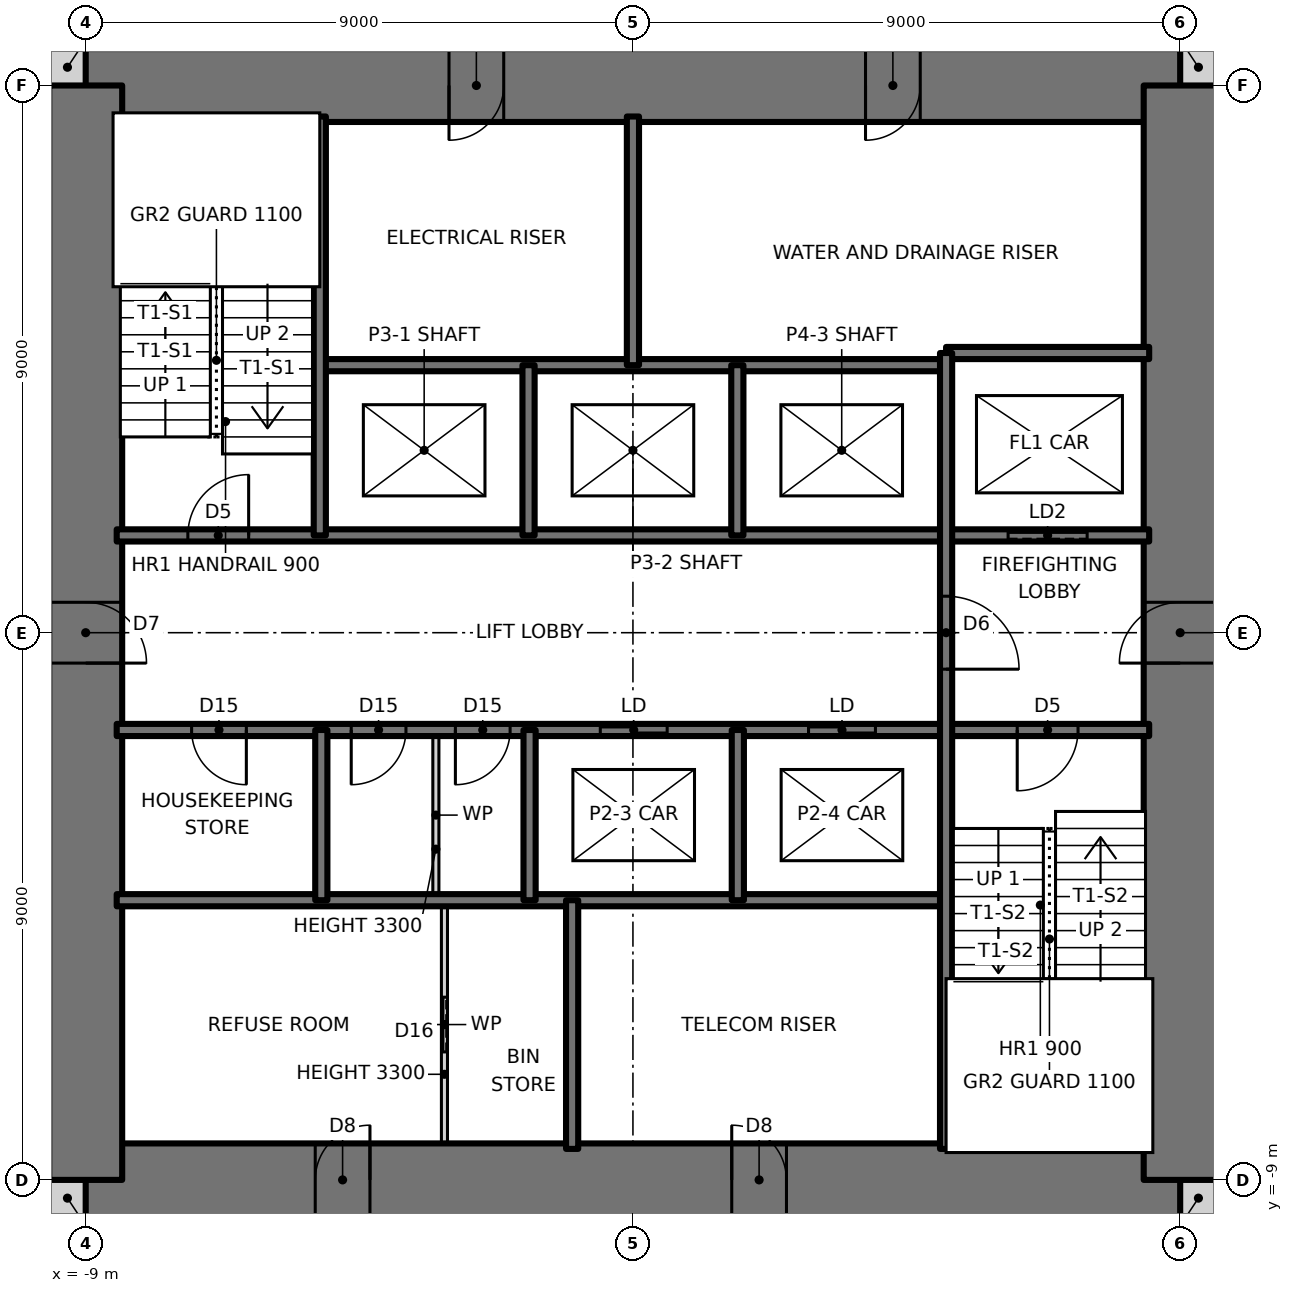
"""IFC4 building model, lengths in metres.
Left out: names, types, materials, properties, quantities, classifications, styles, units other than length and angle.
Written with IfcOpenShell. Run it as: python <this file> out.ifc"""

import sys

from ifc_helpers import new_model, si_unit, direction, frame, frame_2d, origin, place, context, subcontext, project, spatial, rectangle, extrude, element, fill, save


model = new_model("IFC4")
c1 = context("Model", 3, precision=1e-05, world=origin(), true_north=direction((0.0, 1.0)))
c2 = subcontext(c1, "Body", "Model", "MODEL_VIEW")
j1 = project(units=[si_unit("LENGTHUNIT", "METRE"), si_unit("PLANEANGLEUNIT", "RADIAN")], contexts=[c1])
p1 = place(None, origin())
s1 = spatial("IfcSite", under=j1, at=p1, CompositionType="ELEMENT")
p2 = place(p1, origin())
s2 = spatial("IfcBuilding", under=s1, at=p2, CompositionType="ELEMENT")
p3 = place(p2, frame((0.0, 0.0, 136.5)))
s3 = spatial("IfcBuildingStorey", under=s2, at=p3, CompositionType="ELEMENT", Elevation=136.5)
for number, where, z_axis, x_axis in (
    (1, (-9.6, -9.3, 0.0), (0.0, 0.0, 1.0), (1.0, 0.0, 0.0)),
    (2, (9.0, -9.3, 0.0), (0.0, 0.0, 1.0), (1.0, 0.0, 0.0)),
    (3, (9.0, 9.3, 0.0), (0.0, 0.0, 1.0), (1.0, 0.0, 0.0)),
    (4, (-9.6, 9.3, 0.0), (0.0, 0.0, 1.0), (1.0, 0.0, 0.0)),
):
    element("IfcWall", number, at=place(p3, frame(where, z_axis=z_axis, x_axis=x_axis)), inside=s3, PredefinedType="SOLIDWALL", context=c2, shape_type="SweptSolid", body=[
        extrude(rectangle(XDim=0.6, YDim=0.6, at=frame_2d((0.3, 0.0))), origin(), (0.0, 0.0, 1.0), 3.5),
    ])
p4 = place(p3, frame((-9.0, -9.0, 0.0), z_axis=(0.0, 0.0, 1.0), x_axis=(1.0, 0.0, 0.0)))
e5 = element("IfcWall", 5, at=p4, inside=s3, PredefinedType="SHEAR", context=c2, shape_type="SweptSolid", body=[
    extrude(rectangle(XDim=18.0, YDim=1.2, at=frame_2d((9.0, 0.0))), origin(), (0.0, 0.0, 1.0), 3.5),
])
p5 = place(p4, frame((3.775, 0.0, 0.0)))
e6 = element("IfcOpeningElement", 6, at=p5, cuts=e5, PredefinedType="OPENING", context=c2, shape_type="SweptSolid", body=[
    extrude(rectangle(XDim=0.9, YDim=2.1, at=frame_2d((0.45, 1.05))), frame((0.0, 0.61, 0.0), z_axis=(0.0, -1.0, 0.0), x_axis=(1.0, 0.0, 0.0)), (0.0, 0.0, 1.0), 1.22),
])
p6 = place(p4, frame((10.625, 0.0, 0.0)))
e7 = element("IfcOpeningElement", 7, at=p6, cuts=e5, PredefinedType="OPENING", context=c2, shape_type="SweptSolid", body=[
    extrude(rectangle(XDim=0.9, YDim=2.1, at=frame_2d((0.45, 1.05))), frame((0.0, 0.61, 0.0), z_axis=(0.0, -1.0, 0.0), x_axis=(1.0, 0.0, 0.0)), (0.0, 0.0, 1.0), 1.22),
])
p7 = place(p3, frame((9.0, 9.0, 0.0), z_axis=(0.0, 0.0, 1.0), x_axis=(-1.0, 0.0, 0.0)))
e8 = element("IfcWall", 8, at=p7, inside=s3, PredefinedType="SHEAR", context=c2, shape_type="SweptSolid", body=[
    extrude(rectangle(XDim=18.0, YDim=1.2, at=frame_2d((9.0, 0.0))), origin(), (0.0, 0.0, 1.0), 3.5),
])
p8 = place(p7, frame((11.125, 0.0, 0.0)))
e9 = element("IfcOpeningElement", 9, at=p8, cuts=e8, PredefinedType="OPENING", context=c2, shape_type="SweptSolid", body=[
    extrude(rectangle(XDim=0.9, YDim=2.1, at=frame_2d((0.45, 1.05))), frame((0.0, 0.61, 0.0), z_axis=(0.0, -1.0, 0.0), x_axis=(1.0, 0.0, 0.0)), (0.0, 0.0, 1.0), 1.22),
])
p9 = place(p7, frame((4.275, 0.0, 0.0)))
e10 = element("IfcOpeningElement", 10, at=p9, cuts=e8, PredefinedType="OPENING", context=c2, shape_type="SweptSolid", body=[
    extrude(rectangle(XDim=0.9, YDim=2.1, at=frame_2d((0.45, 1.05))), frame((0.0, 0.61, 0.0), z_axis=(0.0, -1.0, 0.0), x_axis=(1.0, 0.0, 0.0)), (0.0, 0.0, 1.0), 1.22),
])
p10 = place(p3, frame((9.0, -9.0, 0.0), z_axis=(0.0, 0.0, 1.0), x_axis=(0.0, 1.0, 0.0)))
e11 = element("IfcWall", 11, at=p10, inside=s3, PredefinedType="SHEAR", context=c2, shape_type="SweptSolid", body=[
    extrude(rectangle(XDim=18.0, YDim=1.2, at=frame_2d((9.0, 0.0))), origin(), (0.0, 0.0, 1.0), 3.5),
])
p11 = place(p10, frame((8.5, 0.0, 0.0)))
e12 = element("IfcOpeningElement", 12, at=p11, cuts=e11, PredefinedType="OPENING", context=c2, shape_type="SweptSolid", body=[
    extrude(rectangle(XDim=1.0, YDim=2.1, at=frame_2d((0.5, 1.05))), frame((0.0, 0.61, 0.0), z_axis=(0.0, -1.0, 0.0), x_axis=(1.0, 0.0, 0.0)), (0.0, 0.0, 1.0), 1.22),
])
p12 = place(p3, frame((-9.0, 9.0, 0.0), z_axis=(0.0, 0.0, 1.0), x_axis=(0.0, -1.0, 0.0)))
e13 = element("IfcWall", 13, at=p12, inside=s3, PredefinedType="SHEAR", context=c2, shape_type="SweptSolid", body=[
    extrude(rectangle(XDim=18.0, YDim=1.2, at=frame_2d((9.0, 0.0))), origin(), (0.0, 0.0, 1.0), 3.5),
])
p13 = place(p12, frame((8.5, 0.0, 0.0)))
e14 = element("IfcOpeningElement", 14, at=p13, cuts=e13, PredefinedType="OPENING", context=c2, shape_type="SweptSolid", body=[
    extrude(rectangle(XDim=1.0, YDim=2.1, at=frame_2d((0.5, 1.05))), frame((0.0, 0.61, 0.0), z_axis=(0.0, -1.0, 0.0), x_axis=(1.0, 0.0, 0.0)), (0.0, 0.0, 1.0), 1.22),
])
p14 = place(p3, frame((-8.49, -4.4, 0.0), z_axis=(0.0, 0.0, 1.0), x_axis=(1.0, 0.0, 0.0)))
e15 = element("IfcWall", 15, at=p14, inside=s3, PredefinedType="SOLIDWALL", context=c2, shape_type="SweptSolid", body=[
    extrude(rectangle(XDim=13.64, YDim=0.2, at=frame_2d((6.82, 0.0))), origin(), (0.0, 0.0, 1.0), 3.5),
])
p15 = place(p3, frame((-8.49, -1.6, 0.0), z_axis=(0.0, 0.0, 1.0), x_axis=(1.0, 0.0, 0.0)))
e16 = element("IfcWall", 16, at=p15, inside=s3, PredefinedType="SOLIDWALL", context=c2, shape_type="SweptSolid", body=[
    extrude(rectangle(XDim=16.98, YDim=0.2, at=frame_2d((8.49, 0.0))), origin(), (0.0, 0.0, 1.0), 3.5),
])
p16 = place(p15, frame((14.81, 0.0, 0.0)))
e17 = element("IfcOpeningElement", 17, at=p16, cuts=e16, PredefinedType="OPENING", context=c2, shape_type="SweptSolid", body=[
    extrude(rectangle(XDim=1.0, YDim=2.1, at=frame_2d((0.5, 1.05))), frame((0.0, 0.11, 0.0), z_axis=(0.0, -1.0, 0.0), x_axis=(1.0, 0.0, 0.0)), (0.0, 0.0, 1.0), 0.22),
])
p17 = place(p15, frame((1.232, 0.0, 0.0)))
e18 = element("IfcOpeningElement", 18, at=p17, cuts=e16, PredefinedType="OPENING", context=c2, shape_type="SweptSolid", body=[
    extrude(rectangle(XDim=0.9, YDim=2.1, at=frame_2d((0.45, 1.05))), frame((0.0, 0.11, 0.0), z_axis=(0.0, -1.0, 0.0), x_axis=(1.0, 0.0, 0.0)), (0.0, 0.0, 1.0), 0.22),
])
p18 = place(p15, frame((5.57, 0.0, 0.0)))
e19 = element("IfcOpeningElement", 19, at=p18, cuts=e16, PredefinedType="OPENING", context=c2, shape_type="SweptSolid", body=[
    extrude(rectangle(XDim=0.9, YDim=2.1, at=frame_2d((0.45, 1.05))), frame((0.0, 0.11, 0.0), z_axis=(0.0, -1.0, 0.0), x_axis=(1.0, 0.0, 0.0)), (0.0, 0.0, 1.0), 0.22),
])
p19 = place(p15, frame((3.857, 0.0, 0.0)))
e20 = element("IfcOpeningElement", 20, at=p19, cuts=e16, PredefinedType="OPENING", context=c2, shape_type="SweptSolid", body=[
    extrude(rectangle(XDim=0.9, YDim=2.1, at=frame_2d((0.45, 1.05))), frame((0.0, 0.11, 0.0), z_axis=(0.0, -1.0, 0.0), x_axis=(1.0, 0.0, 0.0)), (0.0, 0.0, 1.0), 0.22),
])
p20 = place(p15, frame((7.953, 0.0, 0.0)))
e21 = element("IfcOpeningElement", 21, at=p20, cuts=e16, PredefinedType="OPENING", context=c2, shape_type="SweptSolid", body=[
    extrude(rectangle(XDim=1.1, YDim=2.1, at=frame_2d((0.55, 1.05))), frame((0.0, 0.11, 0.0), z_axis=(0.0, -1.0, 0.0), x_axis=(1.0, 0.0, 0.0)), (0.0, 0.0, 1.0), 0.22),
])
p21 = place(p15, frame((11.378, 0.0, 0.0)))
e22 = element("IfcOpeningElement", 22, at=p21, cuts=e16, PredefinedType="OPENING", context=c2, shape_type="SweptSolid", body=[
    extrude(rectangle(XDim=1.1, YDim=2.1, at=frame_2d((0.55, 1.05))), frame((0.0, 0.11, 0.0), z_axis=(0.0, -1.0, 0.0), x_axis=(1.0, 0.0, 0.0)), (0.0, 0.0, 1.0), 0.22),
])
p22 = place(p3, frame((-8.49, 1.6, 0.0), z_axis=(0.0, 0.0, 1.0), x_axis=(1.0, 0.0, 0.0)))
e23 = element("IfcWall", 23, at=p22, inside=s3, PredefinedType="SOLIDWALL", context=c2, shape_type="SweptSolid", body=[
    extrude(rectangle(XDim=16.98, YDim=0.2, at=frame_2d((8.49, 0.0))), origin(), (0.0, 0.0, 1.0), 3.5),
])
p23 = place(p22, frame((1.17, 0.0, 0.0)))
e24 = element("IfcOpeningElement", 24, at=p23, cuts=e23, PredefinedType="OPENING", context=c2, shape_type="SweptSolid", body=[
    extrude(rectangle(XDim=1.0, YDim=2.1, at=frame_2d((0.5, 1.05))), frame((0.0, 0.11, 0.0), z_axis=(0.0, -1.0, 0.0), x_axis=(1.0, 0.0, 0.0)), (0.0, 0.0, 1.0), 0.22),
])
p24 = place(p22, frame((14.66, 0.0, 0.0)))
e25 = element("IfcOpeningElement", 25, at=p24, cuts=e23, PredefinedType="OPENING", context=c2, shape_type="SweptSolid", body=[
    extrude(rectangle(XDim=1.3, YDim=2.1, at=frame_2d((0.65, 1.05))), frame((0.0, 0.11, 0.0), z_axis=(0.0, -1.0, 0.0), x_axis=(1.0, 0.0, 0.0)), (0.0, 0.0, 1.0), 0.22),
])
p25 = place(p3, frame((-5.15, 4.4, 0.0), z_axis=(0.0, 0.0, 1.0), x_axis=(1.0, 0.0, 0.0)))
e26 = element("IfcWall", 26, at=p25, inside=s3, PredefinedType="SOLIDWALL", context=c2, shape_type="SweptSolid", body=[
    extrude(rectangle(XDim=10.3, YDim=0.2, at=frame_2d((5.15, 0.0))), origin(), (0.0, 0.0, 1.0), 3.5),
])
p26 = place(p3, frame((5.15, 4.6, 0.0), z_axis=(0.0, 0.0, 1.0), x_axis=(1.0, 0.0, 0.0)))
e27 = element("IfcWall", 27, at=p26, inside=s3, PredefinedType="SOLIDWALL", context=c2, shape_type="SweptSolid", body=[
    extrude(rectangle(XDim=3.34, YDim=0.2, at=frame_2d((1.67, 0.0))), origin(), (0.0, 0.0, 1.0), 3.5),
])
p27 = place(p3, frame((5.15, -8.49, 0.0), z_axis=(0.0, 0.0, 1.0), x_axis=(0.0, 1.0, 0.0)))
e28 = element("IfcWall", 28, at=p27, inside=s3, PredefinedType="SOLIDWALL", context=c2, shape_type="SweptSolid", body=[
    extrude(rectangle(XDim=13.09, YDim=0.2, at=frame_2d((6.545, 0.0))), origin(), (0.0, 0.0, 1.0), 3.5),
])
p28 = place(p27, frame((7.89, 0.0, 0.0)))
e29 = element("IfcOpeningElement", 29, at=p28, cuts=e28, PredefinedType="OPENING", context=c2, shape_type="SweptSolid", body=[
    extrude(rectangle(XDim=1.2, YDim=2.1, at=frame_2d((0.6, 1.05))), frame((0.0, 0.11, 0.0), z_axis=(0.0, -1.0, 0.0), x_axis=(1.0, 0.0, 0.0)), (0.0, 0.0, 1.0), 0.22),
])
for number, where, z_axis, x_axis in (
    (30, (1.725, -4.4, 0.0), (0.0, 0.0, 1.0), (0.0, 1.0, 0.0)),
    (31, (1.717, 1.6, 0.0), (0.0, 0.0, 1.0), (0.0, 1.0, 0.0)),
):
    element("IfcWall", number, at=place(p3, frame(where, z_axis=z_axis, x_axis=x_axis)), inside=s3, PredefinedType="SOLIDWALL", context=c2, shape_type="SweptSolid", body=[
        extrude(rectangle(XDim=2.8, YDim=0.2, at=frame_2d((1.4, 0.0))), origin(), (0.0, 0.0, 1.0), 3.5),
    ])
for number, where, z_axis, x_axis in (
    (32, (0.0, 4.4, 0.0), (0.0, 0.0, 1.0), (0.0, 1.0, 0.0)),
    (33, (-1.0, -8.49, 0.0), (0.0, 0.0, 1.0), (0.0, 1.0, 0.0)),
):
    element("IfcWall", number, at=place(p3, frame(where, z_axis=z_axis, x_axis=x_axis)), inside=s3, PredefinedType="SOLIDWALL", context=c2, shape_type="SweptSolid", body=[
        extrude(rectangle(XDim=4.09, YDim=0.2, at=frame_2d((2.045, 0.0))), origin(), (0.0, 0.0, 1.0), 3.5),
    ])
for number, where, z_axis, x_axis in (
    (34, (-1.7, -4.4, 0.0), (0.0, 0.0, 1.0), (0.0, 1.0, 0.0)),
    (35, (-1.717, 1.6, 0.0), (0.0, 0.0, 1.0), (0.0, 1.0, 0.0)),
):
    element("IfcWall", number, at=place(p3, frame(where, z_axis=z_axis, x_axis=x_axis)), inside=s3, PredefinedType="SOLIDWALL", context=c2, shape_type="SweptSolid", body=[
        extrude(rectangle(XDim=2.8, YDim=0.2, at=frame_2d((1.4, 0.0))), origin(), (0.0, 0.0, 1.0), 3.5),
    ])
p29 = place(p3, frame((-3.1, -8.49, 0.0), z_axis=(0.0, 0.0, 1.0), x_axis=(0.0, 1.0, 0.0)))
e36 = element("IfcWall", 36, at=p29, inside=s3, PredefinedType="PARTITIONING", context=c2, shape_type="SweptSolid", body=[
    extrude(rectangle(XDim=4.09, YDim=0.1, at=frame_2d((2.045, 0.0))), origin(), (0.0, 0.0, 1.0), 3.3),
])
p30 = place(p29, frame((1.595, 0.0, 0.0)))
e37 = element("IfcOpeningElement", 37, at=p30, cuts=e36, PredefinedType="OPENING", context=c2, shape_type="SweptSolid", body=[
    extrude(rectangle(XDim=0.9, YDim=2.1, at=frame_2d((0.45, 1.05))), frame((0.0, 0.06, 0.0), z_axis=(0.0, -1.0, 0.0), x_axis=(1.0, 0.0, 0.0)), (0.0, 0.0, 1.0), 0.12),
])
p31 = place(p3, frame((-3.241, -4.4, 0.0), z_axis=(0.0, 0.0, 1.0), x_axis=(0.0, 1.0, 0.0)))
e38 = element("IfcWall", 38, at=p31, inside=s3, PredefinedType="PARTITIONING", context=c2, shape_type="SweptSolid", body=[
    extrude(rectangle(XDim=2.8, YDim=0.1, at=frame_2d((1.4, 0.0))), origin(), (0.0, 0.0, 1.0), 3.3),
])
p32 = place(p3, frame((-5.125, -4.4, 0.0), z_axis=(0.0, 0.0, 1.0), x_axis=(0.0, 1.0, 0.0)))
e39 = element("IfcWall", 39, at=p32, inside=s3, PredefinedType="SOLIDWALL", context=c2, shape_type="SweptSolid", body=[
    extrude(rectangle(XDim=2.8, YDim=0.2, at=frame_2d((1.4, 0.0))), origin(), (0.0, 0.0, 1.0), 3.5),
])
p33 = place(p3, frame((-5.15, 1.6, 0.0), z_axis=(0.0, 0.0, 1.0), x_axis=(0.0, 1.0, 0.0)))
e40 = element("IfcWall", 40, at=p33, inside=s3, PredefinedType="SOLIDWALL", context=c2, shape_type="SweptSolid", body=[
    extrude(rectangle(XDim=6.89, YDim=0.2, at=frame_2d((3.445, 0.0))), origin(), (0.0, 0.0, 1.0), 3.5),
])
p34 = place(p23, origin())
e41 = element("IfcDoor", 41, at=p34, inside=s3, OperationType="SINGLE_SWING_RIGHT", PredefinedType="DOOR", context=c2, shape_type="SweptSolid", body=[
    extrude(rectangle(XDim=1.0, YDim=2.1, at=frame_2d((0.5, 1.05))), frame((0.0, 0.025, 0.0), z_axis=(0.0, -1.0, 0.0), x_axis=(1.0, 0.0, 0.0)), (0.0, 0.0, 1.0), 0.05),
])
fill(e24, e41)
p35 = place(p16, frame((1.0, 0.0, 0.0), z_axis=(0.0, 0.0, 1.0), x_axis=(-1.0, 0.0, 0.0)))
e42 = element("IfcDoor", 42, at=p35, inside=s3, OperationType="SINGLE_SWING_RIGHT", PredefinedType="DOOR", context=c2, shape_type="SweptSolid", body=[
    extrude(rectangle(XDim=1.0, YDim=2.1, at=frame_2d((0.5, 1.05))), frame((0.0, 0.025, 0.0), z_axis=(0.0, -1.0, 0.0), x_axis=(1.0, 0.0, 0.0)), (0.0, 0.0, 1.0), 0.05),
])
fill(e17, e42)
p36 = place(p28, frame((1.2, 0.0, 0.0), z_axis=(0.0, 0.0, 1.0), x_axis=(-1.0, 0.0, 0.0)))
e43 = element("IfcDoor", 43, at=p36, inside=s3, OperationType="SINGLE_SWING_RIGHT", PredefinedType="DOOR", context=c2, shape_type="SweptSolid", body=[
    extrude(rectangle(XDim=1.2, YDim=2.1, at=frame_2d((0.6, 1.05))), frame((0.0, 0.025, 0.0), z_axis=(0.0, -1.0, 0.0), x_axis=(1.0, 0.0, 0.0)), (0.0, 0.0, 1.0), 0.05),
])
fill(e29, e43)
p37 = place(p17, frame((0.9, 0.0, 0.0), z_axis=(0.0, 0.0, 1.0), x_axis=(-1.0, 0.0, 0.0)))
e44 = element("IfcDoor", 44, at=p37, inside=s3, OperationType="SINGLE_SWING_LEFT", PredefinedType="DOOR", context=c2, shape_type="SweptSolid", body=[
    extrude(rectangle(XDim=0.9, YDim=2.1, at=frame_2d((0.45, 1.05))), frame((0.0, 0.025, 0.0), z_axis=(0.0, -1.0, 0.0), x_axis=(1.0, 0.0, 0.0)), (0.0, 0.0, 1.0), 0.05),
])
fill(e18, e44)
p38 = place(p18, frame((0.9, 0.0, 0.0), z_axis=(0.0, 0.0, 1.0), x_axis=(-1.0, 0.0, 0.0)))
e45 = element("IfcDoor", 45, at=p38, inside=s3, OperationType="SINGLE_SWING_RIGHT", PredefinedType="DOOR", context=c2, shape_type="SweptSolid", body=[
    extrude(rectangle(XDim=0.9, YDim=2.1, at=frame_2d((0.45, 1.05))), frame((0.0, 0.025, 0.0), z_axis=(0.0, -1.0, 0.0), x_axis=(1.0, 0.0, 0.0)), (0.0, 0.0, 1.0), 0.05),
])
fill(e19, e45)
p39 = place(p19, frame((0.9, 0.0, 0.0), z_axis=(0.0, 0.0, 1.0), x_axis=(-1.0, 0.0, 0.0)))
e46 = element("IfcDoor", 46, at=p39, inside=s3, OperationType="SINGLE_SWING_RIGHT", PredefinedType="DOOR", context=c2, shape_type="SweptSolid", body=[
    extrude(rectangle(XDim=0.9, YDim=2.1, at=frame_2d((0.45, 1.05))), frame((0.0, 0.025, 0.0), z_axis=(0.0, -1.0, 0.0), x_axis=(1.0, 0.0, 0.0)), (0.0, 0.0, 1.0), 0.05),
])
fill(e20, e46)
p40 = place(p30, origin())
e47 = element("IfcDoor", 47, at=p40, inside=s3, OperationType="SLIDING_TO_LEFT", PredefinedType="DOOR", context=c2, shape_type="SweptSolid", body=[
    extrude(rectangle(XDim=0.9, YDim=2.1, at=frame_2d((0.45, 1.05))), frame((0.0, 0.025, 0.0), z_axis=(0.0, -1.0, 0.0), x_axis=(1.0, 0.0, 0.0)), (0.0, 0.0, 1.0), 0.05),
])
fill(e37, e47)
p41 = place(p13, origin())
e48 = element("IfcDoor", 48, at=p41, inside=s3, OperationType="SINGLE_SWING_RIGHT", PredefinedType="DOOR", context=c2, shape_type="SweptSolid", body=[
    extrude(rectangle(XDim=1.0, YDim=2.1, at=frame_2d((0.5, 1.05))), frame((0.0, 0.025, 0.0), z_axis=(0.0, -1.0, 0.0), x_axis=(1.0, 0.0, 0.0)), (0.0, 0.0, 1.0), 0.05),
])
fill(e14, e48)
p42 = place(p11, origin())
e49 = element("IfcDoor", 49, at=p42, inside=s3, OperationType="SINGLE_SWING_LEFT", PredefinedType="DOOR", context=c2, shape_type="SweptSolid", body=[
    extrude(rectangle(XDim=1.0, YDim=2.1, at=frame_2d((0.5, 1.05))), frame((0.0, 0.025, 0.0), z_axis=(0.0, -1.0, 0.0), x_axis=(1.0, 0.0, 0.0)), (0.0, 0.0, 1.0), 0.05),
])
fill(e12, e49)
p43 = place(p8, origin())
e50 = element("IfcDoor", 50, at=p43, inside=s3, OperationType="SINGLE_SWING_RIGHT", PredefinedType="DOOR", context=c2, shape_type="SweptSolid", body=[
    extrude(rectangle(XDim=0.9, YDim=2.1, at=frame_2d((0.45, 1.05))), frame((0.0, 0.025, 0.0), z_axis=(0.0, -1.0, 0.0), x_axis=(1.0, 0.0, 0.0)), (0.0, 0.0, 1.0), 0.05),
])
fill(e9, e50)
p44 = place(p9, origin())
e51 = element("IfcDoor", 51, at=p44, inside=s3, OperationType="SINGLE_SWING_RIGHT", PredefinedType="DOOR", context=c2, shape_type="SweptSolid", body=[
    extrude(rectangle(XDim=0.9, YDim=2.1, at=frame_2d((0.45, 1.05))), frame((0.0, 0.025, 0.0), z_axis=(0.0, -1.0, 0.0), x_axis=(1.0, 0.0, 0.0)), (0.0, 0.0, 1.0), 0.05),
])
fill(e10, e51)
p45 = place(p5, origin())
e52 = element("IfcDoor", 52, at=p45, inside=s3, OperationType="SINGLE_SWING_RIGHT", PredefinedType="DOOR", context=c2, shape_type="SweptSolid", body=[
    extrude(rectangle(XDim=0.9, YDim=2.1, at=frame_2d((0.45, 1.05))), frame((0.0, 0.025, 0.0), z_axis=(0.0, -1.0, 0.0), x_axis=(1.0, 0.0, 0.0)), (0.0, 0.0, 1.0), 0.05),
])
fill(e6, e52)
p46 = place(p6, origin())
e53 = element("IfcDoor", 53, at=p46, inside=s3, OperationType="SINGLE_SWING_LEFT", PredefinedType="DOOR", context=c2, shape_type="SweptSolid", body=[
    extrude(rectangle(XDim=0.9, YDim=2.1, at=frame_2d((0.45, 1.05))), frame((0.0, 0.025, 0.0), z_axis=(0.0, -1.0, 0.0), x_axis=(1.0, 0.0, 0.0)), (0.0, 0.0, 1.0), 0.05),
])
fill(e7, e53)
p47 = place(p20, origin())
e54 = element("IfcDoor", 54, at=p47, inside=s3, OperationType="DOUBLE_DOOR_SLIDING", PredefinedType="DOOR", context=c2, shape_type="SweptSolid", body=[
    extrude(rectangle(XDim=1.1, YDim=2.1, at=frame_2d((0.55, 1.05))), frame((0.0, 0.025, 0.0), z_axis=(0.0, -1.0, 0.0), x_axis=(1.0, 0.0, 0.0)), (0.0, 0.0, 1.0), 0.05),
])
fill(e21, e54)
p48 = place(p21, origin())
e55 = element("IfcDoor", 55, at=p48, inside=s3, OperationType="DOUBLE_DOOR_SLIDING", PredefinedType="DOOR", context=c2, shape_type="SweptSolid", body=[
    extrude(rectangle(XDim=1.1, YDim=2.1, at=frame_2d((0.55, 1.05))), frame((0.0, 0.025, 0.0), z_axis=(0.0, -1.0, 0.0), x_axis=(1.0, 0.0, 0.0)), (0.0, 0.0, 1.0), 0.05),
])
fill(e22, e55)
p49 = place(p24, origin())
e56 = element("IfcDoor", 56, at=p49, inside=s3, OperationType="SLIDING_TO_LEFT", PredefinedType="DOOR", context=c2, shape_type="SweptSolid", body=[
    extrude(rectangle(XDim=1.3, YDim=2.1, at=frame_2d((0.65, 1.05))), frame((0.0, 0.025, 0.0), z_axis=(0.0, -1.0, 0.0), x_axis=(1.0, 0.0, 0.0)), (0.0, 0.0, 1.0), 0.05),
])
fill(e25, e56)
save(model, sys.argv[1])
